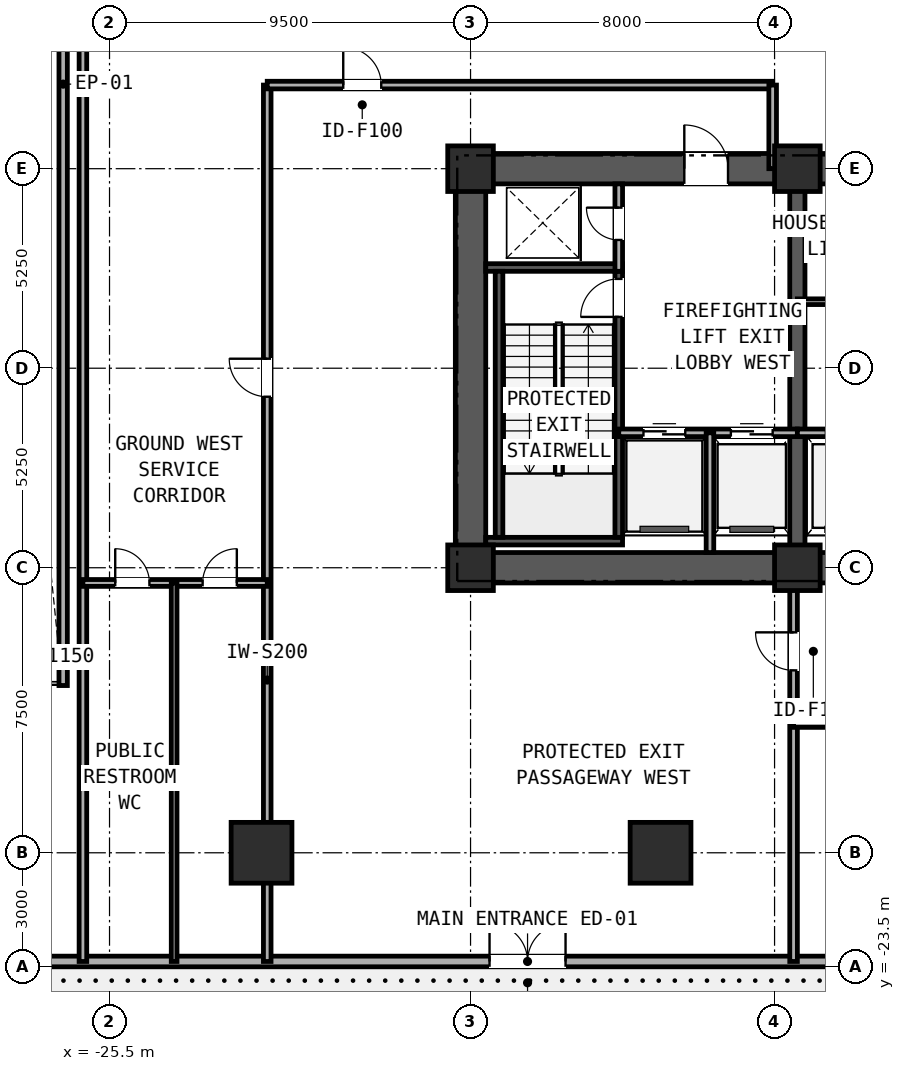
"""IFC4 building model, lengths in metres.
Left out: names, types, materials, properties, quantities, classifications, styles, units other than length and angle.
Written with IfcOpenShell. Run it as: python <this file> out.ifc"""

import sys

from ifc_helpers import new_model, si_unit, direction, frame, frame_2d, origin, origin_2d, place, context, subcontext, project, spatial, rectangle, extrude, element, fill, save


model = new_model("IFC4")
c1 = context("Model", 3, precision=1e-05, world=origin(), true_north=direction((0.0, 1.0)))
c2 = subcontext(c1, "Body", "Model", "MODEL_VIEW")
j1 = project(units=[si_unit("LENGTHUNIT", "METRE"), si_unit("PLANEANGLEUNIT", "RADIAN")], contexts=[c1])
p1 = place(None, origin())
s1 = spatial("IfcSite", under=j1, at=p1, CompositionType="ELEMENT")
p2 = place(p1, origin())
s2 = spatial("IfcBuilding", under=s1, at=p2, CompositionType="ELEMENT")
p3 = place(p2, origin())
s3 = spatial("IfcBuildingStorey", under=s2, at=p3, CompositionType="ELEMENT", Elevation=0.0)
p4 = place(p3, frame((-16.4, -13.0, 0.0), z_axis=(0.0, 0.0, 1.0), x_axis=(1.0, 0.0, 0.0)))
e1 = element("IfcWall", 1, at=p4, inside=s3, PredefinedType="SHEAR", context=c2, shape_type="SweptSolid", body=[
    extrude(rectangle(XDim=32.8, YDim=0.8, at=frame_2d((16.4, 0.0))), origin(), (0.0, 0.0, 1.0), 4.82),
])
p5 = place(p3, frame((-16.4, -2.5, 0.0), z_axis=(0.0, 0.0, 1.0), x_axis=(1.0, 0.0, 0.0)))
e2 = element("IfcWall", 2, at=p5, inside=s3, PredefinedType="SHEAR", context=c2, shape_type="SweptSolid", body=[
    extrude(rectangle(XDim=32.8, YDim=0.8, at=frame_2d((16.4, 0.0))), origin(), (0.0, 0.0, 1.0), 4.82),
])
p6 = place(p5, frame((6.025, 0.0, 0.0)))
e3 = element("IfcOpeningElement", 3, at=p6, cuts=e2, PredefinedType="OPENING", context=c2, shape_type="SweptSolid", body=[
    extrude(rectangle(XDim=1.15, YDim=2.0, at=frame_2d((0.575, 1.0))), frame((0.0, 0.41, 0.0), z_axis=(0.0, -1.0, 0.0), x_axis=(1.0, 0.0, 0.0)), (0.0, 0.0, 1.0), 0.82),
])
p7 = place(p5, frame((15.6, 0.0, 0.0)))
e4 = element("IfcOpeningElement", 4, at=p7, cuts=e2, PredefinedType="OPENING", context=c2, shape_type="SweptSolid", body=[
    extrude(rectangle(XDim=1.6, YDim=2.0, at=frame_2d((0.8, 1.0))), frame((0.0, 0.41, 0.0), z_axis=(0.0, -1.0, 0.0), x_axis=(1.0, 0.0, 0.0)), (0.0, 0.0, 1.0), 0.82),
])
p8 = place(p5, frame((25.625, 0.0, 0.0)))
e5 = element("IfcOpeningElement", 5, at=p8, cuts=e2, PredefinedType="OPENING", context=c2, shape_type="SweptSolid", body=[
    extrude(rectangle(XDim=1.15, YDim=2.0, at=frame_2d((0.575, 1.0))), frame((0.0, 0.41, 0.0), z_axis=(0.0, -1.0, 0.0), x_axis=(1.0, 0.0, 0.0)), (0.0, 0.0, 1.0), 0.82),
])
p9 = place(p3, frame((-16.0, -12.6, 0.0), z_axis=(0.0, 0.0, 1.0), x_axis=(0.0, 1.0, 0.0)))
e6 = element("IfcWall", 6, at=p9, inside=s3, PredefinedType="SHEAR", context=c2, shape_type="SweptSolid", body=[
    extrude(rectangle(XDim=9.7, YDim=0.8, at=frame_2d((4.85, 0.0))), origin(), (0.0, 0.0, 1.0), 4.82),
])
p10 = place(p3, frame((-7.4, -12.6, 0.0), z_axis=(0.0, 0.0, 1.0), x_axis=(0.0, 1.0, 0.0)))
e7 = element("IfcWall", 7, at=p10, inside=s3, PredefinedType="SHEAR", context=c2, shape_type="SweptSolid", body=[
    extrude(rectangle(XDim=9.7, YDim=0.4, at=frame_2d((4.85, 0.0))), origin(), (0.0, 0.0, 1.0), 5.1),
])
for number, where, z_axis, x_axis in (
    (8, (-15.6, -12.3, 0.0), (0.0, 0.0, 1.0), (1.0, 0.0, 0.0)),
    (9, (-15.6, -5.1, 0.0), (0.0, 0.0, 1.0), (1.0, 0.0, 0.0)),
):
    element("IfcWall", number, at=place(p3, frame(where, z_axis=z_axis, x_axis=x_axis)), inside=s3, PredefinedType="SOLIDWALL", context=c2, shape_type="SweptSolid", body=[
        extrude(rectangle(XDim=3.6, YDim=0.2, at=frame_2d((1.8, 0.0))), origin(), (0.0, 0.0, 1.0), 5.1),
    ])
p11 = place(p3, frame((-15.25, -12.2, 0.0), z_axis=(0.0, 0.0, 1.0), x_axis=(0.0, 1.0, 0.0)))
e10 = element("IfcWall", 10, at=p11, inside=s3, PredefinedType="SOLIDWALL", context=c2, shape_type="SweptSolid", body=[
    extrude(rectangle(XDim=7.0, YDim=0.2, at=frame_2d((3.5, 0.0))), origin(), (0.0, 0.0, 1.0), 5.1),
])
p12 = place(p3, frame((-12.1, -12.2, 0.0), z_axis=(0.0, 0.0, 1.0), x_axis=(0.0, 1.0, 0.0)))
e11 = element("IfcWall", 11, at=p12, inside=s3, PredefinedType="SOLIDWALL", context=c2, shape_type="SweptSolid", body=[
    extrude(rectangle(XDim=7.0, YDim=0.2, at=frame_2d((3.5, 0.0))), origin(), (0.0, 0.0, 1.0), 5.1),
])
p13 = place(p12, frame((5.8, 0.0, 0.0)))
e12 = element("IfcOpeningElement", 12, at=p13, cuts=e11, PredefinedType="OPENING", context=c2, shape_type="SweptSolid", body=[
    extrude(rectangle(XDim=1.0, YDim=2.1, at=frame_2d((0.5, 1.05))), frame((0.0, 0.11, 0.0), z_axis=(0.0, -1.0, 0.0), x_axis=(1.0, 0.0, 0.0)), (0.0, 0.0, 1.0), 0.22),
])
for number, where, z_axis, x_axis in (
    (13, (-16.0, -13.0, 0.0), (0.0, 0.0, 1.0), (1.0, 0.0, 0.0)),
    (14, (-7.4, -13.0, 0.0), (0.0, 0.0, 1.0), (1.0, 0.0, 0.0)),
    (15, (-16.0, -2.5, 0.0), (0.0, 0.0, 1.0), (1.0, 0.0, 0.0)),
    (16, (-7.4, -2.5, 0.0), (0.0, 0.0, 1.0), (1.0, 0.0, 0.0)),
):
    element("IfcColumn", number, at=place(p3, frame(where, z_axis=z_axis, x_axis=x_axis)), inside=s3, PredefinedType="COLUMN", context=c2, shape_type="SweptSolid", body=[
        extrude(rectangle(XDim=1.2, YDim=1.2, at=origin_2d()), origin(), (0.0, 0.0, 1.0), 5.4),
    ])
for number, where, z_axis, x_axis in (
    (17, (-21.5, -20.5, 0.0), (0.0, 0.0, 1.0), (1.0, 0.0, 0.0)),
    (18, (-11.0, -20.5, 0.0), (0.0, 0.0, 1.0), (1.0, 0.0, 0.0)),
):
    element("IfcColumn", number, at=place(p3, frame(where, z_axis=z_axis, x_axis=x_axis)), inside=s3, PredefinedType="COLUMN", context=c2, shape_type="SweptSolid", body=[
        extrude(rectangle(XDim=1.6, YDim=1.6, at=origin_2d()), origin(), (0.0, 0.0, 1.0), 5.4),
    ])
p14 = place(p3, frame((-32.4, -23.36, 0.0), z_axis=(0.0, 0.0, 1.0), x_axis=(1.0, 0.0, 0.0)))
e19 = element("IfcWall", 19, at=p14, inside=s3, PredefinedType="STANDARD", context=c2, shape_type="SweptSolid", body=[
    extrude(rectangle(XDim=64.8, YDim=0.28, at=frame_2d((32.4, 0.0))), origin(), (0.0, 0.0, 1.0), 5.1),
])
p15 = place(p14, frame((16.9, 0.0, 0.0)))
e20 = element("IfcOpeningElement", 20, at=p15, cuts=e19, PredefinedType="OPENING", context=c2, shape_type="SweptSolid", body=[
    extrude(rectangle(XDim=2.0, YDim=2.35, at=frame_2d((1.0, 1.175))), frame((0.0, 0.15, 0.0), z_axis=(0.0, -1.0, 0.0), x_axis=(1.0, 0.0, 0.0)), (0.0, 0.0, 1.0), 0.3),
])
p16 = place(p14, frame((45.9, 0.0, 0.0)))
e21 = element("IfcOpeningElement", 21, at=p16, cuts=e19, PredefinedType="OPENING", context=c2, shape_type="SweptSolid", body=[
    extrude(rectangle(XDim=2.0, YDim=2.35, at=frame_2d((1.0, 1.175))), frame((0.0, 0.15, 0.0), z_axis=(0.0, -1.0, 0.0), x_axis=(1.0, 0.0, 0.0)), (0.0, 0.0, 1.0), 0.3),
])
p17 = place(p3, frame((-26.72, -16.1, 0.0), z_axis=(0.0, 0.0, 1.0), x_axis=(0.0, 1.0, 0.0)))
e22 = element("IfcWall", 22, at=p17, inside=s3, PredefinedType="PARAPET", context=c2, shape_type="SweptSolid", body=[
    extrude(rectangle(XDim=31.65, YDim=0.22, at=frame_2d((15.825, 0.0))), origin(), (0.0, 0.0, 1.0), 1.15),
])
p18 = place(p3, frame((-12.1, -5.2, 0.0), z_axis=(0.0, 0.0, 1.0), x_axis=(0.0, 1.0, 0.0)))
e23 = element("IfcWall", 23, at=p18, inside=s3, PredefinedType="PARTITIONING", context=c2, shape_type="SweptSolid", body=[
    extrude(rectangle(XDim=2.3, YDim=0.2, at=frame_2d((1.15, 0.0))), origin(), (0.0, 0.0, 1.0), 5.1),
])
p19 = place(p18, frame((0.825, 0.0, 0.0)))
e24 = element("IfcOpeningElement", 24, at=p19, cuts=e23, PredefinedType="OPENING", context=c2, shape_type="SweptSolid", body=[
    extrude(rectangle(XDim=0.85, YDim=2.05, at=frame_2d((0.425, 1.025))), frame((0.0, 0.11, 0.0), z_axis=(0.0, -1.0, 0.0), x_axis=(1.0, 0.0, 0.0)), (0.0, 0.0, 1.0), 0.22),
])
p20 = place(p3, frame((-12.1, -9.45, 0.0), z_axis=(0.0, 0.0, 1.0), x_axis=(1.0, 0.0, 0.0)))
e25 = element("IfcWall", 25, at=p20, inside=s3, PredefinedType="PARTITIONING", context=c2, shape_type="SweptSolid", body=[
    extrude(rectangle(XDim=4.7, YDim=0.2, at=frame_2d((2.35, 0.0))), origin(), (0.0, 0.0, 1.0), 5.1),
])
p21 = place(p20, frame((0.65, 0.0, 0.0)))
e26 = element("IfcOpeningElement", 26, at=p21, cuts=e25, PredefinedType="OPENING", context=c2, shape_type="SweptSolid", body=[
    extrude(rectangle(XDim=1.1, YDim=2.2, at=frame_2d((0.55, 1.1))), frame((0.0, 0.11, 0.0), z_axis=(0.0, -1.0, 0.0), x_axis=(1.0, 0.0, 0.0)), (0.0, 0.0, 1.0), 0.22),
])
p22 = place(p20, frame((2.95, 0.0, 0.0)))
e27 = element("IfcOpeningElement", 27, at=p22, cuts=e25, PredefinedType="OPENING", context=c2, shape_type="SweptSolid", body=[
    extrude(rectangle(XDim=1.1, YDim=2.2, at=frame_2d((0.55, 1.1))), frame((0.0, 0.11, 0.0), z_axis=(0.0, -1.0, 0.0), x_axis=(1.0, 0.0, 0.0)), (0.0, 0.0, 1.0), 0.22),
])
p23 = place(p3, frame((-9.7, -12.6, 0.0), z_axis=(0.0, 0.0, 1.0), x_axis=(0.0, 1.0, 0.0)))
e28 = element("IfcWall", 28, at=p23, inside=s3, PredefinedType="PARTITIONING", context=c2, shape_type="SweptSolid", body=[
    extrude(rectangle(XDim=3.15, YDim=0.2, at=frame_2d((1.575, 0.0))), origin(), (0.0, 0.0, 1.0), 5.1),
])
p24 = place(p3, frame((-7.4, -9.45, 0.0), z_axis=(0.0, 0.0, 1.0), x_axis=(1.0, 0.0, 0.0)))
e29 = element("IfcWall", 29, at=p24, inside=s3, PredefinedType="PARTITIONING", context=c2, shape_type="SweptSolid", body=[
    extrude(rectangle(XDim=4.85, YDim=0.2, at=frame_2d((2.425, 0.0))), origin(), (0.0, 0.0, 1.0), 5.1),
])
p25 = place(p24, frame((0.75, 0.0, 0.0)))
e30 = element("IfcOpeningElement", 30, at=p25, cuts=e29, PredefinedType="OPENING", context=c2, shape_type="SweptSolid", body=[
    extrude(rectangle(XDim=1.1, YDim=2.2, at=frame_2d((0.55, 1.1))), frame((0.0, 0.11, 0.0), z_axis=(0.0, -1.0, 0.0), x_axis=(1.0, 0.0, 0.0)), (0.0, 0.0, 1.0), 0.22),
])
p26 = place(p24, frame((3.05, 0.0, 0.0)))
e31 = element("IfcOpeningElement", 31, at=p26, cuts=e29, PredefinedType="OPENING", context=c2, shape_type="SweptSolid", body=[
    extrude(rectangle(XDim=1.1, YDim=2.2, at=frame_2d((0.55, 1.1))), frame((0.0, 0.11, 0.0), z_axis=(0.0, -1.0, 0.0), x_axis=(1.0, 0.0, 0.0)), (0.0, 0.0, 1.0), 0.22),
])
p27 = place(p3, frame((-7.4, -6.0, 0.0), z_axis=(0.0, 0.0, 1.0), x_axis=(1.0, 0.0, 0.0)))
e32 = element("IfcWall", 32, at=p27, inside=s3, PredefinedType="PARTITIONING", context=c2, shape_type="SweptSolid", body=[
    extrude(rectangle(XDim=5.8, YDim=0.15, at=frame_2d((2.9, 0.0))), origin(), (0.0, 0.0, 1.0), 5.1),
])
p28 = place(p27, frame((2.525, 0.0, 0.0)))
e33 = element("IfcOpeningElement", 33, at=p28, cuts=e32, PredefinedType="OPENING", context=c2, shape_type="SweptSolid", body=[
    extrude(rectangle(XDim=0.95, YDim=2.15, at=frame_2d((0.475, 1.075))), frame((0.0, 0.085, 0.0), z_axis=(0.0, -1.0, 0.0), x_axis=(1.0, 0.0, 0.0)), (0.0, 0.0, 1.0), 0.17),
])
p29 = place(p3, frame((-21.35, -23.36, 0.0), z_axis=(0.0, 0.0, 1.0), x_axis=(0.0, 1.0, 0.0)))
e34 = element("IfcWall", 34, at=p29, inside=s3, PredefinedType="PARTITIONING", context=c2, shape_type="SweptSolid", body=[
    extrude(rectangle(XDim=23.06, YDim=0.2, at=frame_2d((11.53, 0.0))), origin(), (0.0, 0.0, 1.0), 4.229),
])
p30 = place(p29, frame((14.86, 0.0, 0.0)))
e35 = element("IfcOpeningElement", 35, at=p30, cuts=e34, PredefinedType="OPENING", context=c2, shape_type="SweptSolid", body=[
    extrude(rectangle(XDim=1.0, YDim=2.1, at=frame_2d((0.5, 1.05))), frame((0.0, 0.11, 0.0), z_axis=(0.0, -1.0, 0.0), x_axis=(1.0, 0.0, 0.0)), (0.0, 0.0, 1.0), 0.22),
])
p31 = place(p3, frame((-21.35, -0.3, 0.0), z_axis=(0.0, 0.0, 1.0), x_axis=(1.0, 0.0, 0.0)))
e36 = element("IfcWall", 36, at=p31, inside=s3, PredefinedType="PARTITIONING", context=c2, shape_type="SweptSolid", body=[
    extrude(rectangle(XDim=13.3, YDim=0.2, at=frame_2d((6.65, 0.0))), origin(), (0.0, 0.0, 1.0), 4.229),
])
p32 = place(p31, frame((2.0, 0.0, 0.0)))
e37 = element("IfcOpeningElement", 37, at=p32, cuts=e36, PredefinedType="OPENING", context=c2, shape_type="SweptSolid", body=[
    extrude(rectangle(XDim=1.0, YDim=2.1, at=frame_2d((0.5, 1.05))), frame((0.0, 0.11, 0.0), z_axis=(0.0, -1.0, 0.0), x_axis=(1.0, 0.0, 0.0)), (0.0, 0.0, 1.0), 0.22),
])
p33 = place(p3, frame((-8.05, -2.5, 0.0), z_axis=(0.0, 0.0, 1.0), x_axis=(0.0, 1.0, 0.0)))
e38 = element("IfcWall", 38, at=p33, inside=s3, PredefinedType="PARTITIONING", context=c2, shape_type="SweptSolid", body=[
    extrude(rectangle(XDim=2.2, YDim=0.2, at=frame_2d((1.1, 0.0))), origin(), (0.0, 0.0, 1.0), 4.312),
])
p34 = place(p3, frame((-7.5, -23.36, 0.0), z_axis=(0.0, 0.0, 1.0), x_axis=(0.0, 1.0, 0.0)))
e39 = element("IfcWall", 39, at=p34, inside=s3, PredefinedType="PARTITIONING", context=c2, shape_type="SweptSolid", body=[
    extrude(rectangle(XDim=10.01, YDim=0.2, at=frame_2d((5.005, 0.0))), origin(), (0.0, 0.0, 1.0), 4.229),
])
p35 = place(p34, frame((7.66, 0.0, 0.0)))
e40 = element("IfcOpeningElement", 40, at=p35, cuts=e39, PredefinedType="OPENING", context=c2, shape_type="SweptSolid", body=[
    extrude(rectangle(XDim=1.0, YDim=2.1, at=frame_2d((0.5, 1.05))), frame((0.0, 0.11, 0.0), z_axis=(0.0, -1.0, 0.0), x_axis=(1.0, 0.0, 0.0)), (0.0, 0.0, 1.0), 0.22),
])
p36 = place(p3, frame((-7.5, -17.1, 0.0), z_axis=(0.0, 0.0, 1.0), x_axis=(1.0, 0.0, 0.0)))
e41 = element("IfcWall", 41, at=p36, inside=s3, PredefinedType="PARTITIONING", context=c2, shape_type="SweptSolid", body=[
    extrude(rectangle(XDim=15.0, YDim=0.2, at=frame_2d((7.5, 0.0))), origin(), (0.0, 0.0, 1.0), 4.229),
])
p37 = place(p36, frame((2.8, 0.0, 0.0)))
e42 = element("IfcOpeningElement", 42, at=p37, cuts=e41, PredefinedType="OPENING", context=c2, shape_type="SweptSolid", body=[
    extrude(rectangle(XDim=1.0, YDim=2.1, at=frame_2d((0.5, 1.05))), frame((0.0, 0.11, 0.0), z_axis=(0.0, -1.0, 0.0), x_axis=(1.0, 0.0, 0.0)), (0.0, 0.0, 1.0), 0.22),
])
p38 = place(p36, frame((11.2, 0.0, 0.0)))
e43 = element("IfcOpeningElement", 43, at=p38, cuts=e41, PredefinedType="OPENING", context=c2, shape_type="SweptSolid", body=[
    extrude(rectangle(XDim=1.0, YDim=2.15, at=frame_2d((0.5, 1.075))), frame((0.0, 0.11, 0.0), z_axis=(0.0, -1.0, 0.0), x_axis=(1.0, 0.0, 0.0)), (0.0, 0.0, 1.0), 0.22),
])
p39 = place(p3, frame((-26.2, -23.36, 0.0), z_axis=(0.0, 0.0, 1.0), x_axis=(0.0, 1.0, 0.0)))
e44 = element("IfcWall", 44, at=p39, inside=s3, PredefinedType="PARTITIONING", context=c2, shape_type="SweptSolid", body=[
    extrude(rectangle(XDim=46.72, YDim=0.2, at=frame_2d((23.36, 0.0))), origin(), (0.0, 0.0, 1.0), 4.229),
])
p40 = place(p3, frame((-26.2, -13.4, 0.0), z_axis=(0.0, 0.0, 1.0), x_axis=(1.0, 0.0, 0.0)))
e45 = element("IfcWall", 45, at=p40, inside=s3, PredefinedType="PARTITIONING", context=c2, shape_type="SweptSolid", body=[
    extrude(rectangle(XDim=4.85, YDim=0.18, at=frame_2d((2.425, 0.0))), origin(), (0.0, 0.0, 1.0), 4.55),
])
p41 = place(p40, frame((0.85, 0.0, 0.0)))
e46 = element("IfcOpeningElement", 46, at=p41, cuts=e45, PredefinedType="OPENING", context=c2, shape_type="SweptSolid", body=[
    extrude(rectangle(XDim=0.9, YDim=2.1, at=frame_2d((0.45, 1.05))), frame((0.0, 0.1, 0.0), z_axis=(0.0, -1.0, 0.0), x_axis=(1.0, 0.0, 0.0)), (0.0, 0.0, 1.0), 0.2),
])
p42 = place(p40, frame((3.15, 0.0, 0.0)))
e47 = element("IfcOpeningElement", 47, at=p42, cuts=e45, PredefinedType="OPENING", context=c2, shape_type="SweptSolid", body=[
    extrude(rectangle(XDim=0.9, YDim=2.1, at=frame_2d((0.45, 1.05))), frame((0.0, 0.1, 0.0), z_axis=(0.0, -1.0, 0.0), x_axis=(1.0, 0.0, 0.0)), (0.0, 0.0, 1.0), 0.2),
])
p43 = place(p3, frame((-23.8, -23.36, 0.0), z_axis=(0.0, 0.0, 1.0), x_axis=(0.0, 1.0, 0.0)))
e48 = element("IfcWall", 48, at=p43, inside=s3, PredefinedType="PARTITIONING", context=c2, shape_type="SweptSolid", body=[
    extrude(rectangle(XDim=9.96, YDim=0.15, at=frame_2d((4.98, 0.0))), origin(), (0.0, 0.0, 1.0), 4.312),
])
p44 = place(p15, frame((2.0, 0.0, 0.0), z_axis=(0.0, 0.0, 1.0), x_axis=(-1.0, 0.0, 0.0)))
e49 = element("IfcDoor", 49, at=p44, inside=s3, OperationType="DOUBLE_DOOR_SINGLE_SWING", PredefinedType="DOOR", context=c2, shape_type="SweptSolid", body=[
    extrude(rectangle(XDim=2.0, YDim=2.35, at=frame_2d((1.0, 1.175))), frame((0.0, 0.025, 0.0), z_axis=(0.0, -1.0, 0.0), x_axis=(1.0, 0.0, 0.0)), (0.0, 0.0, 1.0), 0.05),
])
fill(e20, e49)
p45 = place(p13, frame((1.0, 0.0, 0.0), z_axis=(0.0, 0.0, 1.0), x_axis=(-1.0, 0.0, 0.0)))
e50 = element("IfcDoor", 50, at=p45, inside=s3, OperationType="SINGLE_SWING_LEFT", PredefinedType="DOOR", context=c2, shape_type="SweptSolid", body=[
    extrude(rectangle(XDim=1.0, YDim=2.1, at=frame_2d((0.5, 1.05))), frame((0.0, 0.025, 0.0), z_axis=(0.0, -1.0, 0.0), x_axis=(1.0, 0.0, 0.0)), (0.0, 0.0, 1.0), 0.05),
])
fill(e12, e50)
p46 = place(p19, origin())
e51 = element("IfcDoor", 51, at=p46, inside=s3, OperationType="SINGLE_SWING_RIGHT", PredefinedType="DOOR", context=c2, shape_type="SweptSolid", body=[
    extrude(rectangle(XDim=0.85, YDim=2.05, at=frame_2d((0.425, 1.025))), frame((0.0, 0.025, 0.0), z_axis=(0.0, -1.0, 0.0), x_axis=(1.0, 0.0, 0.0)), (0.0, 0.0, 1.0), 0.05),
])
fill(e24, e51)
p47 = place(p21, origin())
e52 = element("IfcDoor", 52, at=p47, inside=s3, OperationType="SLIDING_TO_LEFT", PredefinedType="DOOR", context=c2, shape_type="SweptSolid", body=[
    extrude(rectangle(XDim=1.1, YDim=2.2, at=frame_2d((0.55, 1.1))), frame((0.0, 0.025, 0.0), z_axis=(0.0, -1.0, 0.0), x_axis=(1.0, 0.0, 0.0)), (0.0, 0.0, 1.0), 0.05),
])
fill(e26, e52)
p48 = place(p22, origin())
e53 = element("IfcDoor", 53, at=p48, inside=s3, OperationType="SLIDING_TO_RIGHT", PredefinedType="DOOR", context=c2, shape_type="SweptSolid", body=[
    extrude(rectangle(XDim=1.1, YDim=2.2, at=frame_2d((0.55, 1.1))), frame((0.0, 0.025, 0.0), z_axis=(0.0, -1.0, 0.0), x_axis=(1.0, 0.0, 0.0)), (0.0, 0.0, 1.0), 0.05),
])
fill(e27, e53)
p49 = place(p6, origin())
e54 = element("IfcDoor", 54, at=p49, inside=s3, OperationType="SINGLE_SWING_LEFT", PredefinedType="DOOR", context=c2, shape_type="SweptSolid", body=[
    extrude(rectangle(XDim=1.15, YDim=2.0, at=frame_2d((0.575, 1.0))), frame((0.0, 0.025, 0.0), z_axis=(0.0, -1.0, 0.0), x_axis=(1.0, 0.0, 0.0)), (0.0, 0.0, 1.0), 0.05),
])
fill(e3, e54)
p50 = place(p32, frame((1.0, 0.0, 0.0), z_axis=(0.0, 0.0, 1.0), x_axis=(-1.0, 0.0, 0.0)))
e55 = element("IfcDoor", 55, at=p50, inside=s3, OperationType="SINGLE_SWING_LEFT", PredefinedType="DOOR", context=c2, shape_type="SweptSolid", body=[
    extrude(rectangle(XDim=1.0, YDim=2.1, at=frame_2d((0.5, 1.05))), frame((0.0, 0.025, 0.0), z_axis=(0.0, -1.0, 0.0), x_axis=(1.0, 0.0, 0.0)), (0.0, 0.0, 1.0), 0.05),
])
fill(e37, e55)
p51 = place(p35, origin())
e56 = element("IfcDoor", 56, at=p51, inside=s3, OperationType="SINGLE_SWING_RIGHT", PredefinedType="DOOR", context=c2, shape_type="SweptSolid", body=[
    extrude(rectangle(XDim=1.0, YDim=2.1, at=frame_2d((0.5, 1.05))), frame((0.0, 0.025, 0.0), z_axis=(0.0, -1.0, 0.0), x_axis=(1.0, 0.0, 0.0)), (0.0, 0.0, 1.0), 0.05),
])
fill(e40, e56)
p52 = place(p41, frame((0.9, 0.0, 0.0), z_axis=(0.0, 0.0, 1.0), x_axis=(-1.0, 0.0, 0.0)))
e57 = element("IfcDoor", 57, at=p52, inside=s3, OperationType="SINGLE_SWING_LEFT", PredefinedType="DOOR", context=c2, shape_type="SweptSolid", body=[
    extrude(rectangle(XDim=0.9, YDim=2.1, at=frame_2d((0.45, 1.05))), frame((0.0, 0.025, 0.0), z_axis=(0.0, -1.0, 0.0), x_axis=(1.0, 0.0, 0.0)), (0.0, 0.0, 1.0), 0.05),
])
fill(e46, e57)
p53 = place(p42, frame((0.9, 0.0, 0.0), z_axis=(0.0, 0.0, 1.0), x_axis=(-1.0, 0.0, 0.0)))
e58 = element("IfcDoor", 58, at=p53, inside=s3, OperationType="SINGLE_SWING_RIGHT", PredefinedType="DOOR", context=c2, shape_type="SweptSolid", body=[
    extrude(rectangle(XDim=0.9, YDim=2.1, at=frame_2d((0.45, 1.05))), frame((0.0, 0.025, 0.0), z_axis=(0.0, -1.0, 0.0), x_axis=(1.0, 0.0, 0.0)), (0.0, 0.0, 1.0), 0.05),
])
fill(e47, e58)
p54 = place(p30, origin())
e59 = element("IfcDoor", 59, at=p54, inside=s3, OperationType="SINGLE_SWING_RIGHT", PredefinedType="DOOR", context=c2, shape_type="SweptSolid", body=[
    extrude(rectangle(XDim=1.0, YDim=2.1, at=frame_2d((0.5, 1.05))), frame((0.0, 0.025, 0.0), z_axis=(0.0, -1.0, 0.0), x_axis=(1.0, 0.0, 0.0)), (0.0, 0.0, 1.0), 0.05),
])
fill(e35, e59)
save(model, sys.argv[1])
